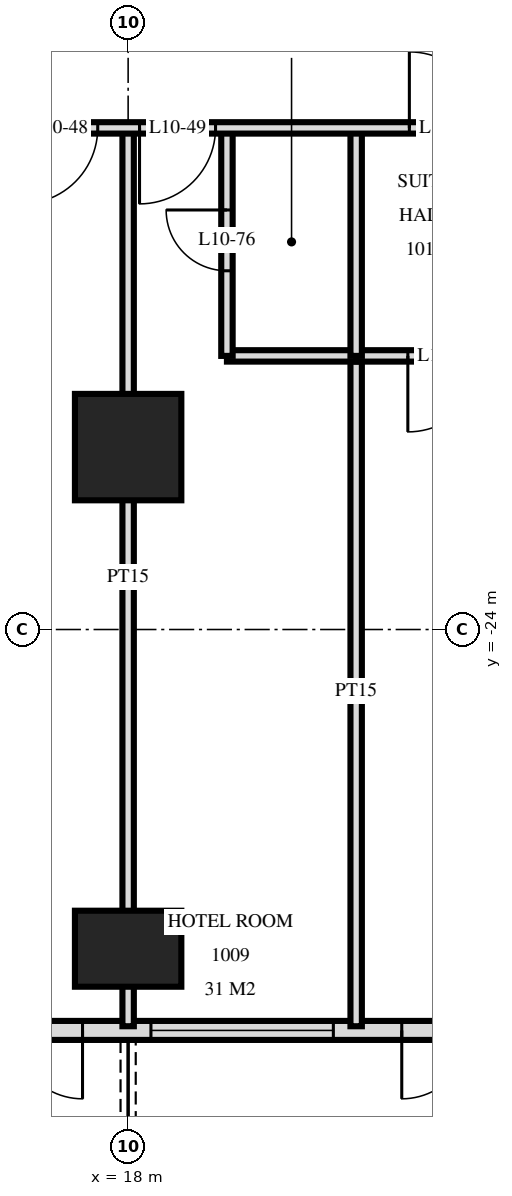
"""IFC4 building model, lengths in metres.
Left out: names, types, materials, properties, quantities, classifications, styles, units other than length and angle.
Written with IfcOpenShell. Run it as: python <this file> out.ifc"""

import sys

from ifc_helpers import new_model, si_unit, direction, frame, frame_2d, origin, origin_2d, place, context, subcontext, project, spatial, rectangle, extrude, element, fill, save


model = new_model("IFC4")
c1 = context("Model", 3, precision=1e-05, world=origin(), true_north=direction((0.0, 1.0)))
c2 = subcontext(c1, "Body", "Model", "MODEL_VIEW")
j1 = project(units=[si_unit("LENGTHUNIT", "METRE"), si_unit("PLANEANGLEUNIT", "RADIAN")], contexts=[c1])
p1 = place(None, origin())
s1 = spatial("IfcSite", under=j1, at=p1, CompositionType="ELEMENT")
p2 = place(p1, origin())
s2 = spatial("IfcBuilding", under=s1, at=p2, CompositionType="ELEMENT")
p3 = place(p2, frame((0.0, 0.0, 45.6)))
s3 = spatial("IfcBuildingStorey", under=s2, at=p3, CompositionType="ELEMENT", Elevation=45.6)
p4 = place(p3, frame((18.0, -28.2, 0.0), z_axis=(0.0, 0.0, 1.0), x_axis=(1.0, 0.0, 0.0)))
e1 = element("IfcColumn", 1, at=p4, inside=s3, PredefinedType="COLUMN", context=c2, shape_type="SweptSolid", body=[
    extrude(rectangle(XDim=1.4, YDim=1.0, at=origin_2d()), origin(), (0.0, 0.0, 1.0), 3.6),
])
p5 = place(p3, frame((18.0, -21.6, 0.0), z_axis=(0.0, 0.0, 1.0), x_axis=(1.0, 0.0, 0.0)))
e2 = element("IfcColumn", 2, at=p5, inside=s3, PredefinedType="COLUMN", context=c2, shape_type="SweptSolid", body=[
    extrude(rectangle(XDim=1.4, YDim=1.4, at=origin_2d()), origin(), (0.0, 0.0, 1.0), 3.6),
])
p6 = place(p3, frame((-28.775, -29.275, 0.0), z_axis=(0.0, 0.0, 1.0), x_axis=(1.0, 0.0, 0.0)))
e3 = element("IfcWall", 3, at=p6, inside=s3, PredefinedType="SOLIDWALL", context=c2, shape_type="SweptSolid", body=[
    extrude(rectangle(XDim=57.551, YDim=0.25, at=frame_2d((28.775, 0.0))), origin(), (0.0, 0.0, 1.0), 3.32),
])
p7 = place(p6, frame((0.575, 0.0, 0.0)))
e4 = element("IfcOpeningElement", 4, at=p7, cuts=e3, PredefinedType="OPENING", context=c2, shape_type="SweptSolid", body=[
    extrude(rectangle(XDim=1.8, YDim=2.4, at=frame_2d((0.9, 1.2))), frame((0.0, 0.135, 0.0), z_axis=(0.0, -1.0, 0.0), x_axis=(1.0, 0.0, 0.0)), (0.0, 0.0, 1.0), 0.27),
])
p8 = place(p6, frame((5.375, 0.0, 0.0)))
e5 = element("IfcOpeningElement", 5, at=p8, cuts=e3, PredefinedType="OPENING", context=c2, shape_type="SweptSolid", body=[
    extrude(rectangle(XDim=1.8, YDim=2.4, at=frame_2d((0.9, 1.2))), frame((0.0, 0.135, 0.0), z_axis=(0.0, -1.0, 0.0), x_axis=(1.0, 0.0, 0.0)), (0.0, 0.0, 1.0), 0.27),
])
p9 = place(p6, frame((8.075, 0.0, 0.3)))
e6 = element("IfcOpeningElement", 6, at=p9, cuts=e3, PredefinedType="OPENING", context=c2, shape_type="SweptSolid", body=[
    extrude(rectangle(XDim=2.4, YDim=2.1, at=frame_2d((1.2, 1.05))), frame((0.0, 0.135, 0.0), z_axis=(0.0, -1.0, 0.0), x_axis=(1.0, 0.0, 0.0)), (0.0, 0.0, 1.0), 0.27),
])
p10 = place(p6, frame((12.875, 0.0, 0.0)))
e7 = element("IfcOpeningElement", 7, at=p10, cuts=e3, PredefinedType="OPENING", context=c2, shape_type="SweptSolid", body=[
    extrude(rectangle(XDim=1.8, YDim=2.4, at=frame_2d((0.9, 1.2))), frame((0.0, 0.135, 0.0), z_axis=(0.0, -1.0, 0.0), x_axis=(1.0, 0.0, 0.0)), (0.0, 0.0, 1.0), 0.27),
])
p11 = place(p6, frame((17.375, 0.0, 0.0)))
e8 = element("IfcOpeningElement", 8, at=p11, cuts=e3, PredefinedType="OPENING", context=c2, shape_type="SweptSolid", body=[
    extrude(rectangle(XDim=1.8, YDim=2.4, at=frame_2d((0.9, 1.2))), frame((0.0, 0.135, 0.0), z_axis=(0.0, -1.0, 0.0), x_axis=(1.0, 0.0, 0.0)), (0.0, 0.0, 1.0), 0.27),
])
p12 = place(p6, frame((20.075, 0.0, 0.3)))
e9 = element("IfcOpeningElement", 9, at=p12, cuts=e3, PredefinedType="OPENING", context=c2, shape_type="SweptSolid", body=[
    extrude(rectangle(XDim=2.4, YDim=2.1, at=frame_2d((1.2, 1.05))), frame((0.0, 0.135, 0.0), z_axis=(0.0, -1.0, 0.0), x_axis=(1.0, 0.0, 0.0)), (0.0, 0.0, 1.0), 0.27),
])
p13 = place(p6, frame((23.075, 0.0, 0.3)))
e10 = element("IfcOpeningElement", 10, at=p13, cuts=e3, PredefinedType="OPENING", context=c2, shape_type="SweptSolid", body=[
    extrude(rectangle(XDim=2.4, YDim=2.1, at=frame_2d((1.2, 1.05))), frame((0.0, 0.135, 0.0), z_axis=(0.0, -1.0, 0.0), x_axis=(1.0, 0.0, 0.0)), (0.0, 0.0, 1.0), 0.27),
])
p14 = place(p6, frame((26.375, 0.0, 0.0)))
e11 = element("IfcOpeningElement", 11, at=p14, cuts=e3, PredefinedType="OPENING", context=c2, shape_type="SweptSolid", body=[
    extrude(rectangle(XDim=1.8, YDim=2.4, at=frame_2d((0.9, 1.2))), frame((0.0, 0.135, 0.0), z_axis=(0.0, -1.0, 0.0), x_axis=(1.0, 0.0, 0.0)), (0.0, 0.0, 1.0), 0.27),
])
p15 = place(p6, frame((29.075, 0.0, 0.3)))
e12 = element("IfcOpeningElement", 12, at=p15, cuts=e3, PredefinedType="OPENING", context=c2, shape_type="SweptSolid", body=[
    extrude(rectangle(XDim=2.4, YDim=2.1, at=frame_2d((1.2, 1.05))), frame((0.0, 0.135, 0.0), z_axis=(0.0, -1.0, 0.0), x_axis=(1.0, 0.0, 0.0)), (0.0, 0.0, 1.0), 0.27),
])
p16 = place(p6, frame((32.375, 0.0, 0.0)))
e13 = element("IfcOpeningElement", 13, at=p16, cuts=e3, PredefinedType="OPENING", context=c2, shape_type="SweptSolid", body=[
    extrude(rectangle(XDim=1.8, YDim=2.4, at=frame_2d((0.9, 1.2))), frame((0.0, 0.135, 0.0), z_axis=(0.0, -1.0, 0.0), x_axis=(1.0, 0.0, 0.0)), (0.0, 0.0, 1.0), 0.27),
])
p17 = place(p6, frame((35.375, 0.0, 0.0)))
e14 = element("IfcOpeningElement", 14, at=p17, cuts=e3, PredefinedType="OPENING", context=c2, shape_type="SweptSolid", body=[
    extrude(rectangle(XDim=1.8, YDim=2.4, at=frame_2d((0.9, 1.2))), frame((0.0, 0.135, 0.0), z_axis=(0.0, -1.0, 0.0), x_axis=(1.0, 0.0, 0.0)), (0.0, 0.0, 1.0), 0.27),
])
p18 = place(p6, frame((38.075, 0.0, 0.3)))
e15 = element("IfcOpeningElement", 15, at=p18, cuts=e3, PredefinedType="OPENING", context=c2, shape_type="SweptSolid", body=[
    extrude(rectangle(XDim=2.4, YDim=2.1, at=frame_2d((1.2, 1.05))), frame((0.0, 0.135, 0.0), z_axis=(0.0, -1.0, 0.0), x_axis=(1.0, 0.0, 0.0)), (0.0, 0.0, 1.0), 0.27),
])
p19 = place(p6, frame((41.075, 0.0, 0.3)))
e16 = element("IfcOpeningElement", 16, at=p19, cuts=e3, PredefinedType="OPENING", context=c2, shape_type="SweptSolid", body=[
    extrude(rectangle(XDim=2.4, YDim=2.1, at=frame_2d((1.2, 1.05))), frame((0.0, 0.135, 0.0), z_axis=(0.0, -1.0, 0.0), x_axis=(1.0, 0.0, 0.0)), (0.0, 0.0, 1.0), 0.27),
])
p20 = place(p6, frame((44.375, 0.0, 0.0)))
e17 = element("IfcOpeningElement", 17, at=p20, cuts=e3, PredefinedType="OPENING", context=c2, shape_type="SweptSolid", body=[
    extrude(rectangle(XDim=1.8, YDim=2.4, at=frame_2d((0.9, 1.2))), frame((0.0, 0.135, 0.0), z_axis=(0.0, -1.0, 0.0), x_axis=(1.0, 0.0, 0.0)), (0.0, 0.0, 1.0), 0.27),
])
p21 = place(p6, frame((47.075, 0.0, 0.3)))
e18 = element("IfcOpeningElement", 18, at=p21, cuts=e3, PredefinedType="OPENING", context=c2, shape_type="SweptSolid", body=[
    extrude(rectangle(XDim=2.4, YDim=2.1, at=frame_2d((1.2, 1.05))), frame((0.0, 0.135, 0.0), z_axis=(0.0, -1.0, 0.0), x_axis=(1.0, 0.0, 0.0)), (0.0, 0.0, 1.0), 0.27),
])
p22 = place(p6, frame((50.375, 0.0, 0.0)))
e19 = element("IfcOpeningElement", 19, at=p22, cuts=e3, PredefinedType="OPENING", context=c2, shape_type="SweptSolid", body=[
    extrude(rectangle(XDim=1.8, YDim=2.4, at=frame_2d((0.9, 1.2))), frame((0.0, 0.135, 0.0), z_axis=(0.0, -1.0, 0.0), x_axis=(1.0, 0.0, 0.0)), (0.0, 0.0, 1.0), 0.27),
])
p23 = place(p6, frame((53.375, 0.0, 0.0)))
e20 = element("IfcOpeningElement", 20, at=p23, cuts=e3, PredefinedType="OPENING", context=c2, shape_type="SweptSolid", body=[
    extrude(rectangle(XDim=1.8, YDim=2.4, at=frame_2d((0.9, 1.2))), frame((0.0, 0.135, 0.0), z_axis=(0.0, -1.0, 0.0), x_axis=(1.0, 0.0, 0.0)), (0.0, 0.0, 1.0), 0.27),
])
p24 = place(p3, frame((21.0, -20.4, 0.0), z_axis=(0.0, 0.0, 1.0), x_axis=(0.0, 1.0, 0.0)))
e21 = element("IfcWall", 21, at=p24, inside=s3, PredefinedType="PARTITIONING", context=c2, shape_type="SweptSolid", body=[
    extrude(rectangle(XDim=3.0, YDim=0.15, at=frame_2d((1.5, 0.0))), origin(), (0.0, 0.0, 1.0), 3.32),
])
p25 = place(p3, frame((21.0, -29.22, 0.0), z_axis=(0.0, 0.0, 1.0), x_axis=(0.0, 1.0, 0.0)))
e22 = element("IfcWall", 22, at=p25, inside=s3, PredefinedType="PARTITIONING", context=c2, shape_type="SweptSolid", body=[
    extrude(rectangle(XDim=8.82, YDim=0.15, at=frame_2d((4.41, 0.0))), origin(), (0.0, 0.0, 1.0), 3.32),
])
p26 = place(p3, frame((19.3, -20.4, 0.0), z_axis=(0.0, 0.0, 1.0), x_axis=(0.0, 1.0, 0.0)))
e23 = element("IfcWall", 23, at=p26, inside=s3, PredefinedType="PARTITIONING", context=c2, shape_type="SweptSolid", body=[
    extrude(rectangle(XDim=3.0, YDim=0.15, at=frame_2d((1.5, 0.0))), origin(), (0.0, 0.0, 1.0), 3.32),
])
p27 = place(p26, frame((1.12, 0.0, 0.0)))
e24 = element("IfcOpeningElement", 24, at=p27, cuts=e23, PredefinedType="OPENING", context=c2, shape_type="SweptSolid", body=[
    extrude(rectangle(XDim=0.8, YDim=2.1, at=frame_2d((0.4, 1.05))), frame((0.0, 0.085, 0.0), z_axis=(0.0, -1.0, 0.0), x_axis=(1.0, 0.0, 0.0)), (0.0, 0.0, 1.0), 0.17),
])
p28 = place(p3, frame((18.0, -29.22, 0.0), z_axis=(0.0, 0.0, 1.0), x_axis=(0.0, 1.0, 0.0)))
e25 = element("IfcWall", 25, at=p28, inside=s3, PredefinedType="PARTITIONING", context=c2, shape_type="SweptSolid", body=[
    extrude(rectangle(XDim=11.82, YDim=0.15, at=frame_2d((5.91, 0.0))), origin(), (0.0, 0.0, 1.0), 3.32),
])
p29 = place(p3, frame((21.0, -20.4, 0.0), z_axis=(0.0, 0.0, 1.0), x_axis=(1.0, 0.0, 0.0)))
e26 = element("IfcWall", 26, at=p29, inside=s3, PredefinedType="PARTITIONING", context=c2, shape_type="SweptSolid", body=[
    extrude(rectangle(XDim=2.4, YDim=0.15, at=frame_2d((1.2, 0.0))), origin(), (0.0, 0.0, 1.0), 3.32),
])
p30 = place(p29, frame((0.68, 0.0, 0.0)))
e27 = element("IfcOpeningElement", 27, at=p30, cuts=e26, PredefinedType="OPENING", context=c2, shape_type="SweptSolid", body=[
    extrude(rectangle(XDim=1.0, YDim=2.1, at=frame_2d((0.5, 1.05))), frame((0.0, 0.085, 0.0), z_axis=(0.0, -1.0, 0.0), x_axis=(1.0, 0.0, 0.0)), (0.0, 0.0, 1.0), 0.17),
])
p31 = place(p3, frame((19.3, -20.4, 0.0), z_axis=(0.0, 0.0, 1.0), x_axis=(1.0, 0.0, 0.0)))
e28 = element("IfcWall", 28, at=p31, inside=s3, PredefinedType="PARTITIONING", context=c2, shape_type="SweptSolid", body=[
    extrude(rectangle(XDim=1.7, YDim=0.15, at=frame_2d((0.85, 0.0))), origin(), (0.0, 0.0, 1.0), 3.32),
])
p32 = place(p3, frame((-33.12, -17.4, 0.0), z_axis=(0.0, 0.0, 1.0), x_axis=(1.0, 0.0, 0.0)))
e29 = element("IfcWall", 29, at=p32, inside=s3, PredefinedType="PARTITIONING", context=c2, shape_type="SweptSolid", body=[
    extrude(rectangle(XDim=66.24, YDim=0.15, at=frame_2d((33.12, 0.0))), origin(), (0.0, 0.0, 1.0), 3.32),
])
p33 = place(p32, frame((9.27, 0.0, 0.0)))
e30 = element("IfcOpeningElement", 30, at=p33, cuts=e29, PredefinedType="OPENING", context=c2, shape_type="SweptSolid", body=[
    extrude(rectangle(XDim=1.0, YDim=2.1, at=frame_2d((0.5, 1.05))), frame((0.0, 0.085, 0.0), z_axis=(0.0, -1.0, 0.0), x_axis=(1.0, 0.0, 0.0)), (0.0, 0.0, 1.0), 0.17),
])
p34 = place(p32, frame((13.97, 0.0, 0.0)))
e31 = element("IfcOpeningElement", 31, at=p34, cuts=e29, PredefinedType="OPENING", context=c2, shape_type="SweptSolid", body=[
    extrude(rectangle(XDim=1.0, YDim=2.1, at=frame_2d((0.5, 1.05))), frame((0.0, 0.085, 0.0), z_axis=(0.0, -1.0, 0.0), x_axis=(1.0, 0.0, 0.0)), (0.0, 0.0, 1.0), 0.17),
])
p35 = place(p32, frame((17.62, 0.0, 0.0)))
e32 = element("IfcOpeningElement", 32, at=p35, cuts=e29, PredefinedType="OPENING", context=c2, shape_type="SweptSolid", body=[
    extrude(rectangle(XDim=1.0, YDim=2.1, at=frame_2d((0.5, 1.05))), frame((0.0, 0.085, 0.0), z_axis=(0.0, -1.0, 0.0), x_axis=(1.0, 0.0, 0.0)), (0.0, 0.0, 1.0), 0.17),
])
p36 = place(p32, frame((21.27, 0.0, 0.0)))
e33 = element("IfcOpeningElement", 33, at=p36, cuts=e29, PredefinedType="OPENING", context=c2, shape_type="SweptSolid", body=[
    extrude(rectangle(XDim=1.0, YDim=2.1, at=frame_2d((0.5, 1.05))), frame((0.0, 0.085, 0.0), z_axis=(0.0, -1.0, 0.0), x_axis=(1.0, 0.0, 0.0)), (0.0, 0.0, 1.0), 0.17),
])
p37 = place(p32, frame((25.97, 0.0, 0.0)))
e34 = element("IfcOpeningElement", 34, at=p37, cuts=e29, PredefinedType="OPENING", context=c2, shape_type="SweptSolid", body=[
    extrude(rectangle(XDim=1.0, YDim=2.1, at=frame_2d((0.5, 1.05))), frame((0.0, 0.085, 0.0), z_axis=(0.0, -1.0, 0.0), x_axis=(1.0, 0.0, 0.0)), (0.0, 0.0, 1.0), 0.17),
])
p38 = place(p32, frame((35.62, 0.0, 0.0)))
e35 = element("IfcOpeningElement", 35, at=p38, cuts=e29, PredefinedType="OPENING", context=c2, shape_type="SweptSolid", body=[
    extrude(rectangle(XDim=1.0, YDim=2.1, at=frame_2d((0.5, 1.05))), frame((0.0, 0.085, 0.0), z_axis=(0.0, -1.0, 0.0), x_axis=(1.0, 0.0, 0.0)), (0.0, 0.0, 1.0), 0.17),
])
p39 = place(p32, frame((40.97, 0.0, 0.0)))
e36 = element("IfcOpeningElement", 36, at=p39, cuts=e29, PredefinedType="OPENING", context=c2, shape_type="SweptSolid", body=[
    extrude(rectangle(XDim=1.0, YDim=2.1, at=frame_2d((0.5, 1.05))), frame((0.0, 0.085, 0.0), z_axis=(0.0, -1.0, 0.0), x_axis=(1.0, 0.0, 0.0)), (0.0, 0.0, 1.0), 0.17),
])
p40 = place(p32, frame((42.27, 0.0, 0.0)))
e37 = element("IfcOpeningElement", 37, at=p40, cuts=e29, PredefinedType="OPENING", context=c2, shape_type="SweptSolid", body=[
    extrude(rectangle(XDim=1.0, YDim=2.1, at=frame_2d((0.5, 1.05))), frame((0.0, 0.085, 0.0), z_axis=(0.0, -1.0, 0.0), x_axis=(1.0, 0.0, 0.0)), (0.0, 0.0, 1.0), 0.17),
])
p41 = place(p32, frame((49.72, 0.0, 0.0)))
e38 = element("IfcOpeningElement", 38, at=p41, cuts=e29, PredefinedType="OPENING", context=c2, shape_type="SweptSolid", body=[
    extrude(rectangle(XDim=1.0, YDim=2.1, at=frame_2d((0.5, 1.05))), frame((0.0, 0.085, 0.0), z_axis=(0.0, -1.0, 0.0), x_axis=(1.0, 0.0, 0.0)), (0.0, 0.0, 1.0), 0.17),
])
p42 = place(p32, frame((51.27, 0.0, 0.0)))
e39 = element("IfcOpeningElement", 39, at=p42, cuts=e29, PredefinedType="OPENING", context=c2, shape_type="SweptSolid", body=[
    extrude(rectangle(XDim=1.0, YDim=2.1, at=frame_2d((0.5, 1.05))), frame((0.0, 0.085, 0.0), z_axis=(0.0, -1.0, 0.0), x_axis=(1.0, 0.0, 0.0)), (0.0, 0.0, 1.0), 0.17),
])
p43 = place(p32, frame((4.42, 0.0, 0.0)))
e40 = element("IfcOpeningElement", 40, at=p43, cuts=e29, PredefinedType="OPENING", context=c2, shape_type="SweptSolid", body=[
    extrude(rectangle(XDim=1.0, YDim=2.1, at=frame_2d((0.5, 1.05))), frame((0.0, 0.085, 0.0), z_axis=(0.0, -1.0, 0.0), x_axis=(1.0, 0.0, 0.0)), (0.0, 0.0, 1.0), 0.17),
])
p44 = place(p32, frame((54.82, 0.0, 0.0)))
e41 = element("IfcOpeningElement", 41, at=p44, cuts=e29, PredefinedType="OPENING", context=c2, shape_type="SweptSolid", body=[
    extrude(rectangle(XDim=1.0, YDim=2.1, at=frame_2d((0.5, 1.05))), frame((0.0, 0.085, 0.0), z_axis=(0.0, -1.0, 0.0), x_axis=(1.0, 0.0, 0.0)), (0.0, 0.0, 1.0), 0.17),
])
p45 = place(p20, frame((0.9, 0.0, 0.0), z_axis=(0.0, 0.0, 1.0), x_axis=(-1.0, 0.0, 0.0)))
e42 = element("IfcDoor", 42, at=p45, inside=s3, OperationType="DOUBLE_DOOR_SINGLE_SWING", PredefinedType="DOOR", context=c2, shape_type="SweptSolid", body=[
    extrude(rectangle(XDim=1.8, YDim=2.4, at=frame_2d((0.0, 1.2))), frame((0.0, -0.025, 0.0), z_axis=(0.0, 1.0, 0.0), x_axis=(-1.0, 0.0, 0.0)), (0.0, 0.0, 1.0), 0.05),
])
fill(e17, e42)
p46 = place(p21, origin())
e43 = element("IfcWindow", 43, at=p46, inside=s3, PartitioningType="SINGLE_PANEL", PredefinedType="WINDOW", context=c2, shape_type="SweptSolid", body=[
    extrude(rectangle(XDim=2.4, YDim=2.1, at=frame_2d((1.2, 1.05))), frame((0.0, 0.03, 0.0), z_axis=(0.0, -1.0, 0.0), x_axis=(1.0, 0.0, 0.0)), (0.0, 0.0, 1.0), 0.06),
])
fill(e18, e43)
p47 = place(p22, frame((0.9, 0.0, 0.0), z_axis=(0.0, 0.0, 1.0), x_axis=(-1.0, 0.0, 0.0)))
e44 = element("IfcDoor", 44, at=p47, inside=s3, OperationType="DOUBLE_DOOR_SINGLE_SWING", PredefinedType="DOOR", context=c2, shape_type="SweptSolid", body=[
    extrude(rectangle(XDim=1.8, YDim=2.4, at=frame_2d((0.0, 1.2))), frame((0.0, -0.025, 0.0), z_axis=(0.0, 1.0, 0.0), x_axis=(-1.0, 0.0, 0.0)), (0.0, 0.0, 1.0), 0.05),
])
fill(e19, e44)
p48 = place(p41, frame((0.5, 0.0, 0.0), z_axis=(0.0, 0.0, 1.0), x_axis=(-1.0, 0.0, 0.0)))
e45 = element("IfcDoor", 45, at=p48, inside=s3, OperationType="SINGLE_SWING_LEFT", PredefinedType="DOOR", context=c2, shape_type="SweptSolid", body=[
    extrude(rectangle(XDim=1.0, YDim=2.1, at=frame_2d((0.0, 1.05))), frame((0.0, -0.025, 0.0), z_axis=(0.0, 1.0, 0.0), x_axis=(-1.0, 0.0, 0.0)), (0.0, 0.0, 1.0), 0.05),
])
fill(e38, e45)
p49 = place(p42, frame((0.5, 0.0, 0.0), z_axis=(0.0, 0.0, 1.0), x_axis=(-1.0, 0.0, 0.0)))
e46 = element("IfcDoor", 46, at=p49, inside=s3, OperationType="SINGLE_SWING_LEFT", PredefinedType="DOOR", context=c2, shape_type="SweptSolid", body=[
    extrude(rectangle(XDim=1.0, YDim=2.1, at=frame_2d((0.0, 1.05))), frame((0.0, -0.025, 0.0), z_axis=(0.0, 1.0, 0.0), x_axis=(-1.0, 0.0, 0.0)), (0.0, 0.0, 1.0), 0.05),
])
fill(e39, e46)
p50 = place(p44, origin())
e47 = element("IfcDoor", 47, at=p50, inside=s3, OperationType="SINGLE_SWING_RIGHT", PredefinedType="DOOR", context=c2, shape_type="SweptSolid", body=[
    extrude(rectangle(XDim=1.0, YDim=2.1, at=frame_2d((0.5, 1.05))), frame((0.0, 0.025, 0.0), z_axis=(0.0, -1.0, 0.0), x_axis=(1.0, 0.0, 0.0)), (0.0, 0.0, 1.0), 0.05),
])
fill(e41, e47)
p51 = place(p27, origin())
e48 = element("IfcDoor", 48, at=p51, inside=s3, OperationType="SINGLE_SWING_LEFT", PredefinedType="DOOR", context=c2, shape_type="SweptSolid", body=[
    extrude(rectangle(XDim=0.8, YDim=2.1, at=frame_2d((0.4, 1.05))), frame((0.0, 0.025, 0.0), z_axis=(0.0, -1.0, 0.0), x_axis=(1.0, 0.0, 0.0)), (0.0, 0.0, 1.0), 0.05),
])
fill(e24, e48)
p52 = place(p30, frame((0.5, 0.0, 0.0), z_axis=(0.0, 0.0, 1.0), x_axis=(-1.0, 0.0, 0.0)))
e49 = element("IfcDoor", 49, at=p52, inside=s3, OperationType="SINGLE_SWING_LEFT", PredefinedType="DOOR", context=c2, shape_type="SweptSolid", body=[
    extrude(rectangle(XDim=1.0, YDim=2.1, at=frame_2d((0.0, 1.05))), frame((0.0, -0.025, 0.0), z_axis=(0.0, 1.0, 0.0), x_axis=(-1.0, 0.0, 0.0)), (0.0, 0.0, 1.0), 0.05),
])
fill(e27, e49)
save(model, sys.argv[1])
